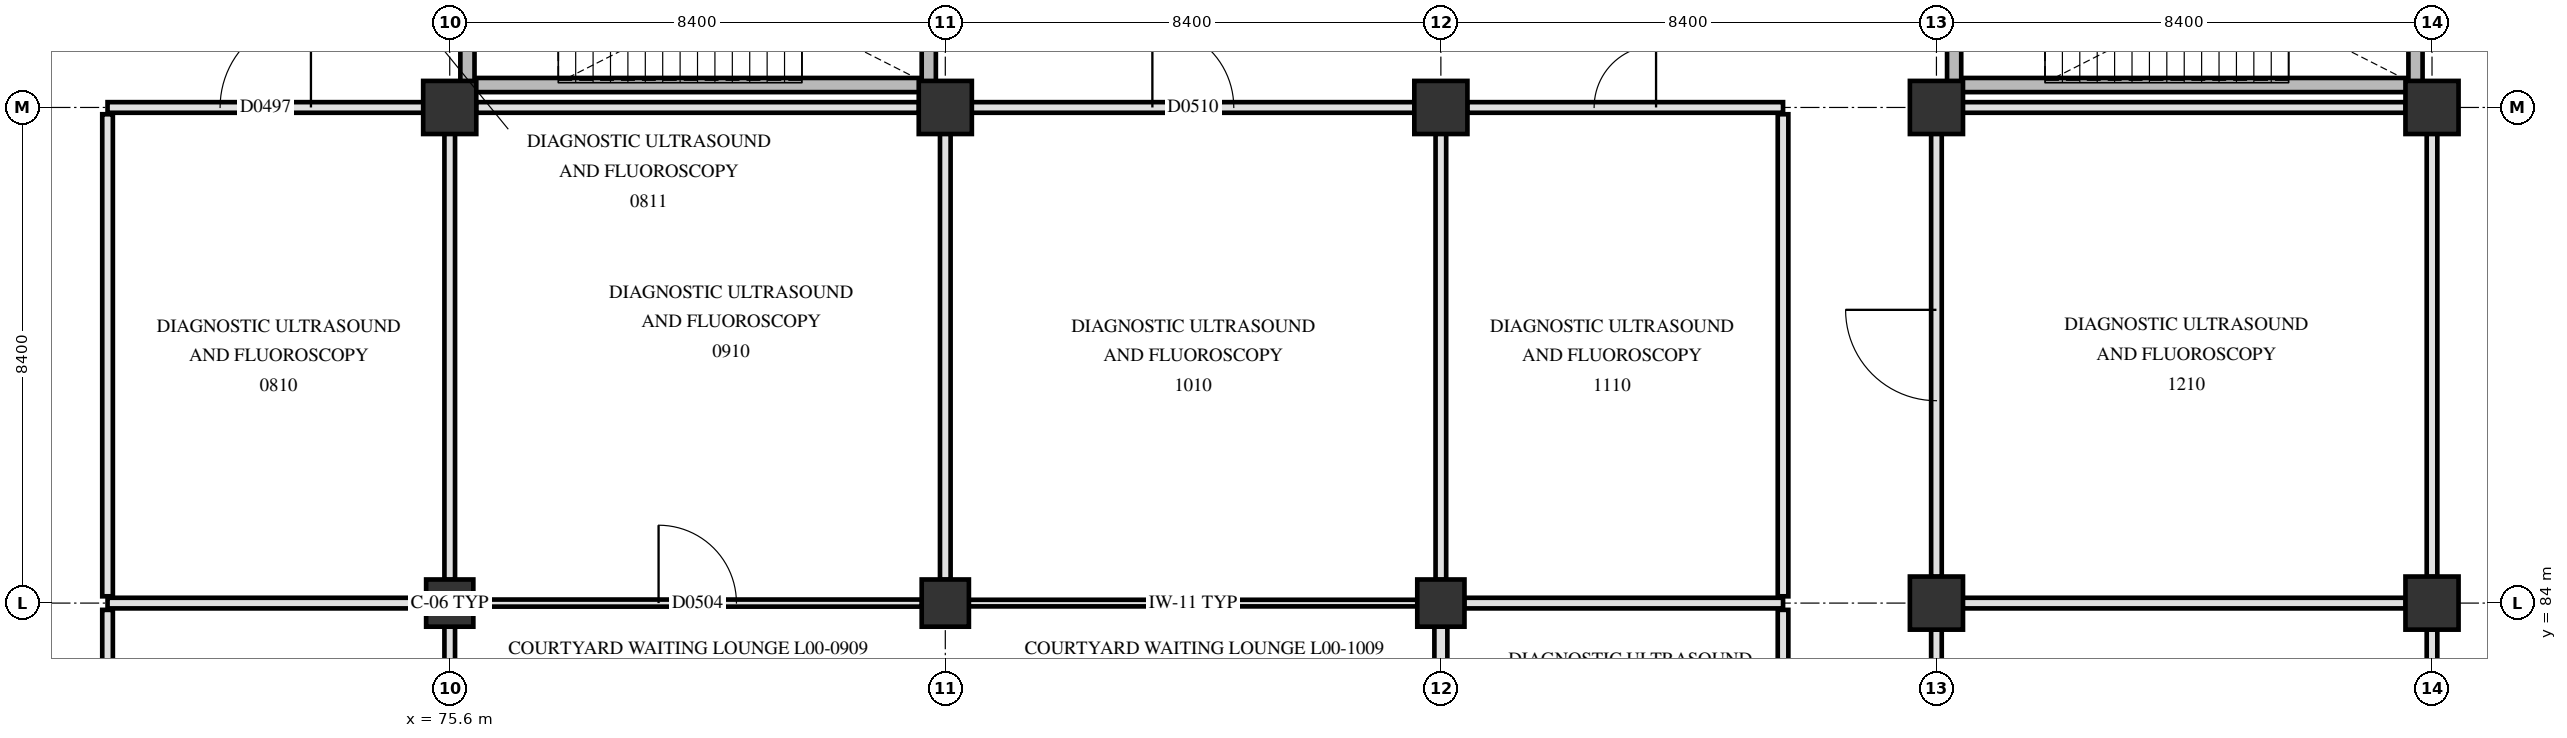
"""IFC4 building model, lengths in metres.
Left out: names, types, materials, properties, quantities, classifications, styles, units other than length and angle.
Written with IfcOpenShell. Run it as: python <this file> out.ifc"""

import sys

from ifc_helpers import new_model, si_unit, direction, frame, frame_2d, origin, origin_2d, place, context, subcontext, project, spatial, rectangle, circle, extrude, element, fill, save


model = new_model("IFC4")
c1 = context("Model", 3, precision=1e-05, world=origin(), true_north=direction((0.0, 1.0)))
c2 = subcontext(c1, "Body", "Model", "MODEL_VIEW")
j1 = project(units=[si_unit("LENGTHUNIT", "METRE"), si_unit("PLANEANGLEUNIT", "RADIAN")], contexts=[c1])
p1 = place(None, origin())
s1 = spatial("IfcSite", under=j1, at=p1, CompositionType="ELEMENT")
p2 = place(p1, origin())
s2 = spatial("IfcBuilding", under=s1, at=p2, CompositionType="ELEMENT")
p3 = place(p2, origin())
s3 = spatial("IfcBuildingStorey", under=s2, at=p3, CompositionType="ELEMENT", Elevation=0.0)
p4 = place(p3, frame((75.6, 84.0, 0.0), z_axis=(0.0, 0.0, 1.0), x_axis=(1.0, 0.0, 0.0)))
e1 = element("IfcColumn", 1, at=p4, inside=s3, PredefinedType="COLUMN", context=c2, shape_type="SweptSolid", body=[
    extrude(circle(Radius=0.4, at=origin_2d()), origin(), (0.0, 0.0, 1.0), 4.8),
])
p5 = place(p3, frame((75.6, 92.4, 0.0), z_axis=(0.0, 0.0, 1.0), x_axis=(1.0, 0.0, 0.0)))
e2 = element("IfcColumn", 2, at=p5, inside=s3, PredefinedType="COLUMN", context=c2, shape_type="SweptSolid", body=[
    extrude(rectangle(XDim=0.9, YDim=0.9, at=origin_2d()), origin(), (0.0, 0.0, 1.0), 4.8),
])
p6 = place(p3, frame((84.0, 84.0, 0.0), z_axis=(0.0, 0.0, 1.0), x_axis=(1.0, 0.0, 0.0)))
e3 = element("IfcColumn", 3, at=p6, inside=s3, PredefinedType="COLUMN", context=c2, shape_type="SweptSolid", body=[
    extrude(circle(Radius=0.4, at=origin_2d()), origin(), (0.0, 0.0, 1.0), 4.8),
])
p7 = place(p3, frame((84.0, 92.4, 0.0), z_axis=(0.0, 0.0, 1.0), x_axis=(1.0, 0.0, 0.0)))
e4 = element("IfcColumn", 4, at=p7, inside=s3, PredefinedType="COLUMN", context=c2, shape_type="SweptSolid", body=[
    extrude(rectangle(XDim=0.9, YDim=0.9, at=origin_2d()), origin(), (0.0, 0.0, 1.0), 4.8),
])
p8 = place(p3, frame((92.4, 84.0, 0.0), z_axis=(0.0, 0.0, 1.0), x_axis=(1.0, 0.0, 0.0)))
e5 = element("IfcColumn", 5, at=p8, inside=s3, PredefinedType="COLUMN", context=c2, shape_type="SweptSolid", body=[
    extrude(circle(Radius=0.4, at=origin_2d()), origin(), (0.0, 0.0, 1.0), 4.8),
])
for number, where, z_axis, x_axis in (
    (6, (92.4, 92.4, 0.0), (0.0, 0.0, 1.0), (1.0, 0.0, 0.0)),
    (7, (100.8, 84.0, 0.0), (0.0, 0.0, 1.0), (1.0, 0.0, 0.0)),
    (8, (100.8, 92.4, 0.0), (0.0, 0.0, 1.0), (1.0, 0.0, 0.0)),
    (9, (109.2, 84.0, 0.0), (0.0, 0.0, 1.0), (1.0, 0.0, 0.0)),
    (10, (109.2, 92.4, 0.0), (0.0, 0.0, 1.0), (1.0, 0.0, 0.0)),
):
    element("IfcColumn", number, at=place(p3, frame(where, z_axis=z_axis, x_axis=x_axis)), inside=s3, PredefinedType="COLUMN", context=c2, shape_type="SweptSolid", body=[
        extrude(rectangle(XDim=0.9, YDim=0.9, at=origin_2d()), origin(), (0.0, 0.0, 1.0), 4.8),
    ])
p9 = place(p3, frame((101.1, 92.78, 0.0), z_axis=(0.0, 0.0, 1.0), x_axis=(1.0, 0.0, 0.0)))
e11 = element("IfcWall", 11, at=p9, inside=s3, PredefinedType="SHEAR", context=c2, shape_type="SweptSolid", body=[
    extrude(rectangle(XDim=7.82, YDim=0.24, at=frame_2d((3.91, 0.0))), origin(), (0.0, 0.0, 1.0), 4.5),
])
for number, where, z_axis, x_axis in (
    (12, (101.1, 92.78, 0.0), (0.0, 0.0, 1.0), (0.0, 1.0, 0.0)),
    (13, (108.92, 92.78, 0.0), (0.0, 0.0, 1.0), (0.0, 1.0, 0.0)),
):
    element("IfcWall", number, at=place(p3, frame(where, z_axis=z_axis, x_axis=x_axis)), inside=s3, PredefinedType="SHEAR", context=c2, shape_type="SweptSolid", body=[
        extrude(rectangle(XDim=3.32, YDim=0.24, at=frame_2d((1.66, 0.0))), origin(), (0.0, 0.0, 1.0), 4.5),
    ])
p10 = place(p3, frame((75.9, 92.78, 0.0), z_axis=(0.0, 0.0, 1.0), x_axis=(1.0, 0.0, 0.0)))
e14 = element("IfcWall", 14, at=p10, inside=s3, PredefinedType="SHEAR", context=c2, shape_type="SweptSolid", body=[
    extrude(rectangle(XDim=7.82, YDim=0.24, at=frame_2d((3.91, 0.0))), origin(), (0.0, 0.0, 1.0), 4.5),
])
for number, where, z_axis, x_axis in (
    (15, (75.9, 92.78, 0.0), (0.0, 0.0, 1.0), (0.0, 1.0, 0.0)),
    (16, (83.72, 92.78, 0.0), (0.0, 0.0, 1.0), (0.0, 1.0, 0.0)),
):
    element("IfcWall", number, at=place(p3, frame(where, z_axis=z_axis, x_axis=x_axis)), inside=s3, PredefinedType="SHEAR", context=c2, shape_type="SweptSolid", body=[
        extrude(rectangle(XDim=3.32, YDim=0.24, at=frame_2d((1.66, 0.0))), origin(), (0.0, 0.0, 1.0), 4.5),
    ])
p11 = place(p3, frame((69.8, 84.0, 0.0), z_axis=(0.0, 0.0, 1.0), x_axis=(1.0, 0.0, 0.0)))
e17 = element("IfcWall", 17, at=p11, inside=s3, PredefinedType="PARTITIONING", context=c2, shape_type="SweptSolid", body=[
    extrude(rectangle(XDim=5.405, YDim=0.18, at=frame_2d((2.703, 0.0))), origin(), (0.0, 0.0, 1.0), 3.84),
])
p12 = place(p3, frame((75.995, 84.0, 0.0), z_axis=(0.0, 0.0, 1.0), x_axis=(1.0, 0.0, 0.0)))
e18 = element("IfcWall", 18, at=p12, inside=s3, PredefinedType="PARTITIONING", context=c2, shape_type="SweptSolid", body=[
    extrude(rectangle(XDim=7.61, YDim=0.12, at=frame_2d((3.805, 0.0))), origin(), (0.0, 0.0, 1.0), 3.84),
])
p13 = place(p12, frame((3.145, 0.0, 0.0)))
e19 = element("IfcOpeningElement", 19, at=p13, cuts=e18, PredefinedType="OPENING", context=c2, shape_type="SweptSolid", body=[
    extrude(rectangle(XDim=1.32, YDim=2.18, at=frame_2d((0.66, 1.09))), frame((0.0, 0.07, 0.0), z_axis=(0.0, -1.0, 0.0), x_axis=(1.0, 0.0, 0.0)), (0.0, 0.0, 1.0), 0.14),
])
p14 = place(p3, frame((84.395, 84.0, 0.0), z_axis=(0.0, 0.0, 1.0), x_axis=(1.0, 0.0, 0.0)))
e20 = element("IfcWall", 20, at=p14, inside=s3, PredefinedType="PARTITIONING", context=c2, shape_type="SweptSolid", body=[
    extrude(rectangle(XDim=7.61, YDim=0.112, at=frame_2d((3.805, 0.0))), origin(), (0.0, 0.0, 1.0), 3.84),
])
p15 = place(p3, frame((92.795, 84.0, 0.0), z_axis=(0.0, 0.0, 1.0), x_axis=(1.0, 0.0, 0.0)))
e21 = element("IfcWall", 21, at=p15, inside=s3, PredefinedType="PARTITIONING", context=c2, shape_type="SweptSolid", body=[
    extrude(rectangle(XDim=5.405, YDim=0.18, at=frame_2d((2.703, 0.0))), origin(), (0.0, 0.0, 1.0), 3.84),
])
p16 = place(p3, frame((101.245, 84.0, 0.0), z_axis=(0.0, 0.0, 1.0), x_axis=(1.0, 0.0, 0.0)))
e22 = element("IfcWall", 22, at=p16, inside=s3, PredefinedType="PARTITIONING", context=c2, shape_type="SweptSolid", body=[
    extrude(rectangle(XDim=7.51, YDim=0.18, at=frame_2d((3.755, 0.0))), origin(), (0.0, 0.0, 1.0), 3.84),
])
p17 = place(p3, frame((69.8, 92.4, 0.0), z_axis=(0.0, 0.0, 1.0), x_axis=(1.0, 0.0, 0.0)))
e23 = element("IfcWall", 23, at=p17, inside=s3, PredefinedType="PARTITIONING", context=c2, shape_type="SweptSolid", body=[
    extrude(rectangle(XDim=5.355, YDim=0.18, at=frame_2d((2.677, 0.0))), origin(), (0.0, 0.0, 1.0), 3.84),
])
p18 = place(p17, frame((1.907, 0.0, 0.0)))
e24 = element("IfcOpeningElement", 24, at=p18, cuts=e23, PredefinedType="OPENING", context=c2, shape_type="SweptSolid", body=[
    extrude(rectangle(XDim=1.54, YDim=2.24, at=frame_2d((0.77, 1.12))), frame((0.0, 0.1, 0.0), z_axis=(0.0, -1.0, 0.0), x_axis=(1.0, 0.0, 0.0)), (0.0, 0.0, 1.0), 0.2),
])
p19 = place(p3, frame((76.045, 92.4, 0.0), z_axis=(0.0, 0.0, 1.0), x_axis=(1.0, 0.0, 0.0)))
e25 = element("IfcWall", 25, at=p19, inside=s3, PredefinedType="PARTITIONING", context=c2, shape_type="SweptSolid", body=[
    extrude(rectangle(XDim=7.51, YDim=0.18, at=frame_2d((3.755, 0.0))), origin(), (0.0, 0.0, 1.0), 3.84),
])
p20 = place(p3, frame((84.445, 92.4, 0.0), z_axis=(0.0, 0.0, 1.0), x_axis=(1.0, 0.0, 0.0)))
e26 = element("IfcWall", 26, at=p20, inside=s3, PredefinedType="PARTITIONING", context=c2, shape_type="SweptSolid", body=[
    extrude(rectangle(XDim=7.51, YDim=0.18, at=frame_2d((3.755, 0.0))), origin(), (0.0, 0.0, 1.0), 3.84),
])
p21 = place(p20, frame((3.065, 0.0, 0.0)))
e27 = element("IfcOpeningElement", 27, at=p21, cuts=e26, PredefinedType="OPENING", context=c2, shape_type="SweptSolid", body=[
    extrude(rectangle(XDim=1.38, YDim=2.22, at=frame_2d((0.69, 1.11))), frame((0.0, 0.1, 0.0), z_axis=(0.0, -1.0, 0.0), x_axis=(1.0, 0.0, 0.0)), (0.0, 0.0, 1.0), 0.2),
])
p22 = place(p3, frame((92.845, 92.4, 0.0), z_axis=(0.0, 0.0, 1.0), x_axis=(1.0, 0.0, 0.0)))
e28 = element("IfcWall", 28, at=p22, inside=s3, PredefinedType="PARTITIONING", context=c2, shape_type="SweptSolid", body=[
    extrude(rectangle(XDim=5.355, YDim=0.18, at=frame_2d((2.677, 0.0))), origin(), (0.0, 0.0, 1.0), 3.84),
])
p23 = place(p22, frame((2.153, 0.0, 0.0)))
e29 = element("IfcOpeningElement", 29, at=p23, cuts=e28, PredefinedType="OPENING", context=c2, shape_type="SweptSolid", body=[
    extrude(rectangle(XDim=1.05, YDim=2.15, at=frame_2d((0.525, 1.075))), frame((0.0, 0.1, 0.0), z_axis=(0.0, -1.0, 0.0), x_axis=(1.0, 0.0, 0.0)), (0.0, 0.0, 1.0), 0.2),
])
p24 = place(p3, frame((101.245, 92.4, 0.0), z_axis=(0.0, 0.0, 1.0), x_axis=(1.0, 0.0, 0.0)))
e30 = element("IfcWall", 30, at=p24, inside=s3, PredefinedType="PARTITIONING", context=c2, shape_type="SweptSolid", body=[
    extrude(rectangle(XDim=7.51, YDim=0.18, at=frame_2d((3.755, 0.0))), origin(), (0.0, 0.0, 1.0), 3.84),
])
p25 = place(p3, frame((69.8, 78.315, 0.0), z_axis=(0.0, 0.0, 1.0), x_axis=(0.0, 1.0, 0.0)))
e31 = element("IfcWall", 31, at=p25, inside=s3, PredefinedType="PARTITIONING", context=c2, shape_type="SweptSolid", body=[
    extrude(rectangle(XDim=5.57, YDim=0.18, at=frame_2d((2.785, 0.0))), origin(), (0.0, 0.0, 1.0), 3.84),
])
p26 = place(p3, frame((69.8, 84.115, 0.0), z_axis=(0.0, 0.0, 1.0), x_axis=(0.0, 1.0, 0.0)))
e32 = element("IfcWall", 32, at=p26, inside=s3, PredefinedType="PARTITIONING", context=c2, shape_type="SweptSolid", body=[
    extrude(rectangle(XDim=8.17, YDim=0.18, at=frame_2d((4.085, 0.0))), origin(), (0.0, 0.0, 1.0), 3.84),
])
p27 = place(p3, frame((75.6, 78.315, 0.0), z_axis=(0.0, 0.0, 1.0), x_axis=(0.0, 1.0, 0.0)))
e33 = element("IfcWall", 33, at=p27, inside=s3, PredefinedType="PARTITIONING", context=c2, shape_type="SweptSolid", body=[
    extrude(rectangle(XDim=5.29, YDim=0.18, at=frame_2d((2.645, 0.0))), origin(), (0.0, 0.0, 1.0), 3.89),
])
for number, where, z_axis, x_axis in (
    (34, (75.6, 84.395, 0.0), (0.0, 0.0, 1.0), (0.0, 1.0, 0.0)),
    (35, (84.0, 84.395, 0.0), (0.0, 0.0, 1.0), (0.0, 1.0, 0.0)),
):
    element("IfcWall", number, at=place(p3, frame(where, z_axis=z_axis, x_axis=x_axis)), inside=s3, PredefinedType="PARTITIONING", context=c2, shape_type="SweptSolid", body=[
        extrude(rectangle(XDim=7.56, YDim=0.18, at=frame_2d((3.78, 0.0))), origin(), (0.0, 0.0, 1.0), 3.89),
    ])
p28 = place(p3, frame((92.4, 78.315, 0.0), z_axis=(0.0, 0.0, 1.0), x_axis=(0.0, 1.0, 0.0)))
e36 = element("IfcWall", 36, at=p28, inside=s3, PredefinedType="PARTITIONING", context=c2, shape_type="SweptSolid", body=[
    extrude(rectangle(XDim=5.29, YDim=0.22, at=frame_2d((2.645, 0.0))), origin(), (0.0, 0.0, 1.0), 3.89),
])
p29 = place(p3, frame((92.4, 84.395, 0.0), z_axis=(0.0, 0.0, 1.0), x_axis=(0.0, 1.0, 0.0)))
e37 = element("IfcWall", 37, at=p29, inside=s3, PredefinedType="PARTITIONING", context=c2, shape_type="SweptSolid", body=[
    extrude(rectangle(XDim=7.56, YDim=0.18, at=frame_2d((3.78, 0.0))), origin(), (0.0, 0.0, 1.0), 3.89),
])
p30 = place(p3, frame((98.2, 78.315, 0.0), z_axis=(0.0, 0.0, 1.0), x_axis=(0.0, 1.0, 0.0)))
e38 = element("IfcWall", 38, at=p30, inside=s3, PredefinedType="PARTITIONING", context=c2, shape_type="SweptSolid", body=[
    extrude(rectangle(XDim=5.57, YDim=0.18, at=frame_2d((2.785, 0.0))), origin(), (0.0, 0.0, 1.0), 3.84),
])
p31 = place(p3, frame((98.2, 84.115, 0.0), z_axis=(0.0, 0.0, 1.0), x_axis=(0.0, 1.0, 0.0)))
e39 = element("IfcWall", 39, at=p31, inside=s3, PredefinedType="PARTITIONING", context=c2, shape_type="SweptSolid", body=[
    extrude(rectangle(XDim=8.17, YDim=0.18, at=frame_2d((4.085, 0.0))), origin(), (0.0, 0.0, 1.0), 3.84),
])
p32 = place(p3, frame((100.8, 78.315, 0.0), z_axis=(0.0, 0.0, 1.0), x_axis=(0.0, 1.0, 0.0)))
e40 = element("IfcWall", 40, at=p32, inside=s3, PredefinedType="PARTITIONING", context=c2, shape_type="SweptSolid", body=[
    extrude(rectangle(XDim=5.24, YDim=0.18, at=frame_2d((2.62, 0.0))), origin(), (0.0, 0.0, 1.0), 3.89),
])
p33 = place(p3, frame((100.8, 84.445, 0.0), z_axis=(0.0, 0.0, 1.0), x_axis=(0.0, 1.0, 0.0)))
e41 = element("IfcWall", 41, at=p33, inside=s3, PredefinedType="PARTITIONING", context=c2, shape_type="SweptSolid", body=[
    extrude(rectangle(XDim=7.51, YDim=0.18, at=frame_2d((3.755, 0.0))), origin(), (0.0, 0.0, 1.0), 3.89),
])
p34 = place(p33, frame((2.985, 0.0, 0.0)))
e42 = element("IfcOpeningElement", 42, at=p34, cuts=e41, PredefinedType="OPENING", context=c2, shape_type="SweptSolid", body=[
    extrude(rectangle(XDim=1.54, YDim=2.24, at=frame_2d((0.77, 1.12))), frame((0.0, 0.1, 0.0), z_axis=(0.0, -1.0, 0.0), x_axis=(1.0, 0.0, 0.0)), (0.0, 0.0, 1.0), 0.2),
])
p35 = place(p3, frame((109.2, 78.315, 0.0), z_axis=(0.0, 0.0, 1.0), x_axis=(0.0, 1.0, 0.0)))
e43 = element("IfcWall", 43, at=p35, inside=s3, PredefinedType="PARTITIONING", context=c2, shape_type="SweptSolid", body=[
    extrude(rectangle(XDim=5.24, YDim=0.18, at=frame_2d((2.62, 0.0))), origin(), (0.0, 0.0, 1.0), 3.89),
])
p36 = place(p3, frame((109.2, 84.445, 0.0), z_axis=(0.0, 0.0, 1.0), x_axis=(0.0, 1.0, 0.0)))
e44 = element("IfcWall", 44, at=p36, inside=s3, PredefinedType="PARTITIONING", context=c2, shape_type="SweptSolid", body=[
    extrude(rectangle(XDim=7.51, YDim=0.18, at=frame_2d((3.755, 0.0))), origin(), (0.0, 0.0, 1.0), 3.89),
])
p37 = place(p18, origin())
e45 = element("IfcDoor", 45, at=p37, inside=s3, OperationType="SINGLE_SWING_RIGHT", PredefinedType="DOOR", context=c2, shape_type="SweptSolid", body=[
    extrude(rectangle(XDim=1.54, YDim=2.24, at=frame_2d((0.77, 1.12))), frame((0.0, 0.025, 0.0), z_axis=(0.0, -1.0, 0.0), x_axis=(1.0, 0.0, 0.0)), (0.0, 0.0, 1.0), 0.05),
])
fill(e24, e45)
p38 = place(p13, origin())
e46 = element("IfcDoor", 46, at=p38, inside=s3, OperationType="SINGLE_SWING_LEFT", PredefinedType="DOOR", context=c2, shape_type="SweptSolid", body=[
    extrude(rectangle(XDim=1.32, YDim=2.18, at=frame_2d((0.66, 1.09))), frame((0.0, 0.025, 0.0), z_axis=(0.0, -1.0, 0.0), x_axis=(1.0, 0.0, 0.0)), (0.0, 0.0, 1.0), 0.05),
])
fill(e19, e46)
p39 = place(p21, origin())
e47 = element("IfcDoor", 47, at=p39, inside=s3, OperationType="SINGLE_SWING_LEFT", PredefinedType="DOOR", context=c2, shape_type="SweptSolid", body=[
    extrude(rectangle(XDim=1.38, YDim=2.22, at=frame_2d((0.69, 1.11))), frame((0.0, 0.025, 0.0), z_axis=(0.0, -1.0, 0.0), x_axis=(1.0, 0.0, 0.0)), (0.0, 0.0, 1.0), 0.05),
])
fill(e27, e47)
p40 = place(p23, origin())
e48 = element("IfcDoor", 48, at=p40, inside=s3, OperationType="SINGLE_SWING_RIGHT", PredefinedType="DOOR", context=c2, shape_type="SweptSolid", body=[
    extrude(rectangle(XDim=1.05, YDim=2.15, at=frame_2d((0.525, 1.075))), frame((0.0, 0.025, 0.0), z_axis=(0.0, -1.0, 0.0), x_axis=(1.0, 0.0, 0.0)), (0.0, 0.0, 1.0), 0.05),
])
fill(e29, e48)
p41 = place(p34, origin())
e49 = element("IfcDoor", 49, at=p41, inside=s3, OperationType="SINGLE_SWING_RIGHT", PredefinedType="DOOR", context=c2, shape_type="SweptSolid", body=[
    extrude(rectangle(XDim=1.54, YDim=2.24, at=frame_2d((0.77, 1.12))), frame((0.0, 0.025, 0.0), z_axis=(0.0, -1.0, 0.0), x_axis=(1.0, 0.0, 0.0)), (0.0, 0.0, 1.0), 0.05),
])
fill(e42, e49)
save(model, sys.argv[1])
